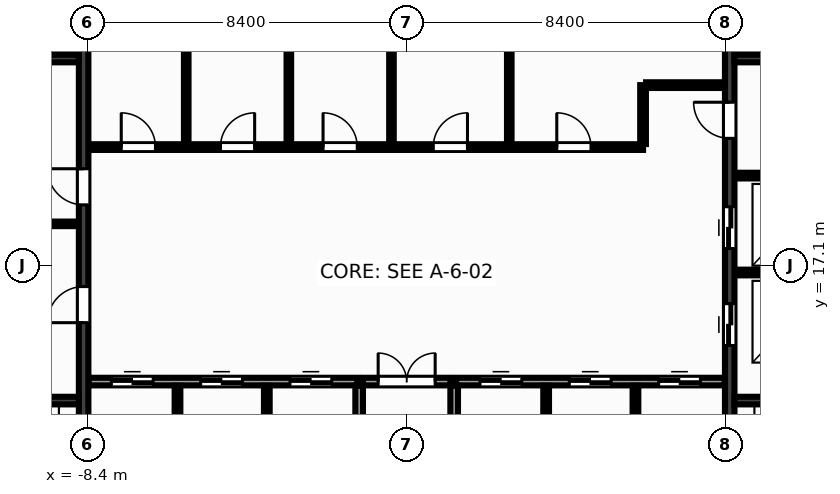
"""IFC4 building model, lengths in metres.
Left out: names, types, materials, properties, quantities, classifications, styles, units other than length and angle.
Written with IfcOpenShell. Run it as: python <this file> out.ifc"""

import sys

from ifc_helpers import new_model, si_unit, direction, frame, frame_2d, origin, place, context, subcontext, project, spatial, rectangle, extrude, source, transform, mapped, element, fill, save


model = new_model("IFC4")
c1 = context("Model", 3, precision=1e-05, world=origin(), true_north=direction((0.0, 1.0)))
c2 = subcontext(c1, "Body", "Model", "MODEL_VIEW")
j1 = project(units=[si_unit("LENGTHUNIT", "METRE"), si_unit("PLANEANGLEUNIT", "RADIAN")], contexts=[c1])
p1 = place(None, origin())
s1 = spatial("IfcSite", under=j1, at=p1, CompositionType="ELEMENT")
p2 = place(p1, origin())
s2 = spatial("IfcBuilding", under=s1, at=p2, CompositionType="ELEMENT")
p3 = place(p2, origin())
s3 = spatial("IfcBuildingStorey", under=s2, at=p3, CompositionType="ELEMENT", Elevation=0.0)
m1 = source(origin(), c2, "Body", "SweptSolid", [
    extrude(rectangle(XDim=12.8, YDim=0.25, at=frame_2d((6.4, 0.0))), origin(), (0.0, 0.0, 1.0), 5.0),
])
p4 = place(p3, frame((-8.5, 10.6, 0.0), z_axis=(0.0, 0.0, 1.0), x_axis=(0.0, 1.0, 0.0)))
e1 = element("IfcWall", 1, at=p4, inside=s3, PredefinedType="SHEAR", context=c2, shape_type="MappedRepresentation", body=[
    mapped(m1, transform((0.0, 0.0, 0.0), x_axis=(1.0, 0.0, 0.0), y_axis=(0.0, 1.0, 0.0), z_axis=(0.0, 0.0, 1.0), scale=1.0)),
])
p5 = place(p4, frame((5.0, 0.0, 0.0)))
e2 = element("IfcOpeningElement", 2, at=p5, cuts=e1, PredefinedType="OPENING", context=c2, shape_type="SweptSolid", body=[
    extrude(rectangle(XDim=0.95, YDim=2.15, at=frame_2d((0.475, 1.075))), frame((0.0, 0.137, 0.0), z_axis=(0.0, -1.0, 0.0), x_axis=(1.0, 0.0, 0.0)), (0.0, 0.0, 1.0), 0.274),
])
p6 = place(p4, frame((8.1, 0.0, 0.0)))
e3 = element("IfcOpeningElement", 3, at=p6, cuts=e1, PredefinedType="OPENING", context=c2, shape_type="SweptSolid", body=[
    extrude(rectangle(XDim=0.95, YDim=2.15, at=frame_2d((0.475, 1.075))), frame((0.0, 0.137, 0.0), z_axis=(0.0, -1.0, 0.0), x_axis=(1.0, 0.0, 0.0)), (0.0, 0.0, 1.0), 0.274),
])
p7 = place(p3, frame((8.5, 10.6, 0.0), z_axis=(0.0, 0.0, 1.0), x_axis=(0.0, 1.0, 0.0)))
e4 = element("IfcWall", 4, at=p7, inside=s3, PredefinedType="SHEAR", context=c2, shape_type="MappedRepresentation", body=[
    mapped(m1, transform((0.0, 0.0, 0.0), x_axis=(1.0, 0.0, 0.0), y_axis=(0.0, 1.0, 0.0), z_axis=(0.0, 0.0, 1.0), scale=1.0)),
])
p8 = place(p7, frame((4.4, 0.0, 0.0)))
e5 = element("IfcOpeningElement", 5, at=p8, cuts=e4, PredefinedType="OPENING", context=c2, shape_type="SweptSolid", body=[
    extrude(rectangle(XDim=1.1, YDim=2.15, at=frame_2d((0.55, 1.075))), frame((0.0, 0.137, 0.0), z_axis=(0.0, -1.0, 0.0), x_axis=(1.0, 0.0, 0.0)), (0.0, 0.0, 1.0), 0.274),
])
p9 = place(p7, frame((6.95, 0.0, 0.0)))
e6 = element("IfcOpeningElement", 6, at=p9, cuts=e4, PredefinedType="OPENING", context=c2, shape_type="SweptSolid", body=[
    extrude(rectangle(XDim=1.1, YDim=2.15, at=frame_2d((0.55, 1.075))), frame((0.0, 0.137, 0.0), z_axis=(0.0, -1.0, 0.0), x_axis=(1.0, 0.0, 0.0)), (0.0, 0.0, 1.0), 0.274),
])
p10 = place(p7, frame((9.85, 0.0, 0.0)))
e7 = element("IfcOpeningElement", 7, at=p10, cuts=e4, PredefinedType="OPENING", context=c2, shape_type="SweptSolid", body=[
    extrude(rectangle(XDim=0.95, YDim=2.15, at=frame_2d((0.475, 1.075))), frame((0.0, 0.137, 0.0), z_axis=(0.0, -1.0, 0.0), x_axis=(1.0, 0.0, 0.0)), (0.0, 0.0, 1.0), 0.274),
])
m2 = source(origin(), c2, "Body", "SweptSolid", [
    extrude(rectangle(XDim=2.825, YDim=0.2, at=frame_2d((1.413, 0.0))), origin(), (0.0, 0.0, 1.0), 5.0),
])
for number, where, z_axis, x_axis in (
    (8, (-11.45, 13.55, 0.0), (0.0, 0.0, 1.0), (1.0, 0.0, 0.0)),
    (9, (8.625, 13.55, 0.0), (0.0, 0.0, 1.0), (1.0, 0.0, 0.0)),
):
    element("IfcWall", number, at=place(p3, frame(where, z_axis=z_axis, x_axis=x_axis)), inside=s3, PredefinedType="SHEAR", context=c2, shape_type="MappedRepresentation", body=[
        mapped(m2, transform((0.0, 0.0, 0.0), x_axis=(1.0, 0.0, 0.0), y_axis=(0.0, 1.0, 0.0), z_axis=(0.0, 0.0, 1.0), scale=1.0)),
    ])
m3 = source(origin(), c2, "Body", "SweptSolid", [
    extrude(rectangle(XDim=3.02, YDim=0.2, at=frame_2d((1.51, 0.0))), origin(), (0.0, 0.0, 1.0), 5.0),
])
for number, where, z_axis, x_axis in (
    (10, (-11.645, 22.55, 0.0), (0.0, 0.0, 1.0), (1.0, 0.0, 0.0)),
    (11, (8.625, 22.55, 0.0), (0.0, 0.0, 1.0), (1.0, 0.0, 0.0)),
):
    element("IfcWall", number, at=place(p3, frame(where, z_axis=z_axis, x_axis=x_axis)), inside=s3, PredefinedType="SHEAR", context=c2, shape_type="MappedRepresentation", body=[
        mapped(m3, transform((0.0, 0.0, 0.0), x_axis=(1.0, 0.0, 0.0), y_axis=(0.0, 1.0, 0.0), z_axis=(0.0, 0.0, 1.0), scale=1.0)),
    ])
m4 = source(origin(), c2, "Body", "SweptSolid", [
    extrude(rectangle(XDim=3.01, YDim=0.12, at=frame_2d((1.505, 0.0))), origin(), (0.0, 0.0, 1.0), 4.72),
])
p11 = place(p3, frame((-11.64, 18.2, 0.0), z_axis=(0.0, 0.0, 1.0), x_axis=(1.0, 0.0, 0.0)))
e12 = element("IfcWall", 12, at=p11, inside=s3, PredefinedType="PARTITIONING", context=c2, shape_type="MappedRepresentation", body=[
    mapped(m4, transform((0.0, 0.0, 0.0), x_axis=(1.0, 0.0, 0.0), y_axis=(0.0, 1.0, 0.0), z_axis=(0.0, 0.0, 1.0), scale=1.0)),
])
m5 = source(origin(), c2, "Body", "SweptSolid", [
    extrude(rectangle(XDim=3.01, YDim=0.15, at=frame_2d((1.505, 0.0))), origin(), (0.0, 0.0, 1.0), 4.72),
])
for number, where, z_axis, x_axis in (
    (13, (8.63, 16.92, 0.0), (0.0, 0.0, 1.0), (1.0, 0.0, 0.0)),
    (14, (8.63, 19.47, 0.0), (0.0, 0.0, 1.0), (1.0, 0.0, 0.0)),
):
    element("IfcWall", number, at=place(p3, frame(where, z_axis=z_axis, x_axis=x_axis)), inside=s3, PredefinedType="PARTITIONING", context=c2, shape_type="MappedRepresentation", body=[
        mapped(m5, transform((0.0, 0.0, 0.0), x_axis=(1.0, 0.0, 0.0), y_axis=(0.0, 1.0, 0.0), z_axis=(0.0, 0.0, 1.0), scale=1.0)),
    ])
m6 = source(origin(), c2, "Body", "SweptSolid", [
    extrude(rectangle(XDim=7.07, YDim=0.2, at=frame_2d((3.535, 0.0))), origin(), (0.0, 0.0, 1.0), 4.72),
])
p12 = place(p3, frame((-8.37, 14.05, 0.0), z_axis=(0.0, 0.0, 1.0), x_axis=(1.0, 0.0, 0.0)))
e15 = element("IfcWall", 15, at=p12, inside=s3, PredefinedType="PARTITIONING", context=c2, shape_type="MappedRepresentation", body=[
    mapped(m6, transform((0.0, 0.0, 0.0), x_axis=(1.0, 0.0, 0.0), y_axis=(0.0, 1.0, 0.0), z_axis=(0.0, 0.0, 1.0), scale=1.0)),
])
p13 = place(p12, frame((0.6, 0.0, 0.0)))
e16 = element("IfcOpeningElement", 16, at=p13, cuts=e15, PredefinedType="OPENING", context=c2, shape_type="SweptSolid", body=[
    extrude(rectangle(XDim=1.1, YDim=2.15, at=frame_2d((0.55, 1.075))), frame((0.0, 0.112, 0.0), z_axis=(0.0, -1.0, 0.0), x_axis=(1.0, 0.0, 0.0)), (0.0, 0.0, 1.0), 0.224),
])
p14 = place(p12, frame((2.95, 0.0, 0.0)))
e17 = element("IfcOpeningElement", 17, at=p14, cuts=e15, PredefinedType="OPENING", context=c2, shape_type="SweptSolid", body=[
    extrude(rectangle(XDim=1.1, YDim=2.15, at=frame_2d((0.55, 1.075))), frame((0.0, 0.112, 0.0), z_axis=(0.0, -1.0, 0.0), x_axis=(1.0, 0.0, 0.0)), (0.0, 0.0, 1.0), 0.224),
])
p15 = place(p12, frame((5.3, 0.0, 0.0)))
e18 = element("IfcOpeningElement", 18, at=p15, cuts=e15, PredefinedType="OPENING", context=c2, shape_type="SweptSolid", body=[
    extrude(rectangle(XDim=1.1, YDim=2.15, at=frame_2d((0.55, 1.075))), frame((0.0, 0.112, 0.0), z_axis=(0.0, -1.0, 0.0), x_axis=(1.0, 0.0, 0.0)), (0.0, 0.0, 1.0), 0.224),
])
p16 = place(p3, frame((1.3, 14.05, 0.0), z_axis=(0.0, 0.0, 1.0), x_axis=(1.0, 0.0, 0.0)))
e19 = element("IfcWall", 19, at=p16, inside=s3, PredefinedType="PARTITIONING", context=c2, shape_type="MappedRepresentation", body=[
    mapped(m6, transform((0.0, 0.0, 0.0), x_axis=(1.0, 0.0, 0.0), y_axis=(0.0, 1.0, 0.0), z_axis=(0.0, 0.0, 1.0), scale=1.0)),
])
p17 = place(p16, frame((0.63, 0.0, 0.0)))
e20 = element("IfcOpeningElement", 20, at=p17, cuts=e19, PredefinedType="OPENING", context=c2, shape_type="SweptSolid", body=[
    extrude(rectangle(XDim=1.1, YDim=2.15, at=frame_2d((0.55, 1.075))), frame((0.0, 0.112, 0.0), z_axis=(0.0, -1.0, 0.0), x_axis=(1.0, 0.0, 0.0)), (0.0, 0.0, 1.0), 0.224),
])
p18 = place(p16, frame((2.98, 0.0, 0.0)))
e21 = element("IfcOpeningElement", 21, at=p18, cuts=e19, PredefinedType="OPENING", context=c2, shape_type="SweptSolid", body=[
    extrude(rectangle(XDim=1.1, YDim=2.15, at=frame_2d((0.55, 1.075))), frame((0.0, 0.112, 0.0), z_axis=(0.0, -1.0, 0.0), x_axis=(1.0, 0.0, 0.0)), (0.0, 0.0, 1.0), 0.224),
])
p19 = place(p16, frame((5.33, 0.0, 0.0)))
e22 = element("IfcOpeningElement", 22, at=p19, cuts=e19, PredefinedType="OPENING", context=c2, shape_type="SweptSolid", body=[
    extrude(rectangle(XDim=1.1, YDim=2.15, at=frame_2d((0.55, 1.075))), frame((0.0, 0.112, 0.0), z_axis=(0.0, -1.0, 0.0), x_axis=(1.0, 0.0, 0.0)), (0.0, 0.0, 1.0), 0.224),
])
m7 = source(origin(), c2, "Body", "SweptSolid", [
    extrude(rectangle(XDim=3.34, YDim=0.2, at=frame_2d((1.67, 0.0))), origin(), (0.0, 0.0, 1.0), 4.72),
])
for number, where, z_axis, x_axis in (
    (23, (-1.25, 10.6, 0.0), (0.0, 0.0, 1.0), (0.0, 1.0, 0.0)),
    (24, (1.25, 10.6, 0.0), (0.0, 0.0, 1.0), (0.0, 1.0, 0.0)),
):
    element("IfcWall", number, at=place(p3, frame(where, z_axis=z_axis, x_axis=x_axis)), inside=s3, PredefinedType="PARTITIONING", context=c2, shape_type="MappedRepresentation", body=[
        mapped(m7, transform((0.0, 0.0, 0.0), x_axis=(1.0, 0.0, 0.0), y_axis=(0.0, 1.0, 0.0), z_axis=(0.0, 0.0, 1.0), scale=1.0)),
    ])
m8 = source(origin(), c2, "Body", "SweptSolid", [
    extrude(rectangle(XDim=2.3, YDim=0.2, at=frame_2d((1.15, 0.0))), origin(), (0.0, 0.0, 1.0), 4.72),
])
p20 = place(p3, frame((-1.15, 14.05, 0.0), z_axis=(0.0, 0.0, 1.0), x_axis=(1.0, 0.0, 0.0)))
e25 = element("IfcWall", 25, at=p20, inside=s3, PredefinedType="PARTITIONING", context=c2, shape_type="MappedRepresentation", body=[
    mapped(m8, transform((0.0, 0.0, 0.0), x_axis=(1.0, 0.0, 0.0), y_axis=(0.0, 1.0, 0.0), z_axis=(0.0, 0.0, 1.0), scale=1.0)),
])
p21 = place(p20, frame((0.4, 0.0, 0.0)))
e26 = element("IfcOpeningElement", 26, at=p21, cuts=e25, PredefinedType="OPENING", context=c2, shape_type="SweptSolid", body=[
    extrude(rectangle(XDim=1.5, YDim=2.2, at=frame_2d((0.75, 1.1))), frame((0.0, 0.112, 0.0), z_axis=(0.0, -1.0, 0.0), x_axis=(1.0, 0.0, 0.0)), (0.0, 0.0, 1.0), 0.224),
])
m9 = source(origin(), c2, "Body", "SweptSolid", [
    extrude(rectangle(XDim=14.59, YDim=0.15, at=frame_2d((7.295, 0.0))), origin(), (0.0, 0.0, 1.0), 4.72),
])
p22 = place(p3, frame((-8.37, 20.22, 0.0), z_axis=(0.0, 0.0, 1.0), x_axis=(1.0, 0.0, 0.0)))
e27 = element("IfcWall", 27, at=p22, inside=s3, PredefinedType="PARTITIONING", context=c2, shape_type="MappedRepresentation", body=[
    mapped(m9, transform((0.0, 0.0, 0.0), x_axis=(1.0, 0.0, 0.0), y_axis=(0.0, 1.0, 0.0), z_axis=(0.0, 0.0, 1.0), scale=1.0)),
])
p23 = place(p22, frame((0.86, 0.0, 0.0)))
e28 = element("IfcOpeningElement", 28, at=p23, cuts=e27, PredefinedType="OPENING", context=c2, shape_type="SweptSolid", body=[
    extrude(rectangle(XDim=0.9, YDim=2.15, at=frame_2d((0.45, 1.075))), frame((0.0, 0.087, 0.0), z_axis=(0.0, -1.0, 0.0), x_axis=(1.0, 0.0, 0.0)), (0.0, 0.0, 1.0), 0.174),
])
p24 = place(p22, frame((3.47, 0.0, 0.0)))
e29 = element("IfcOpeningElement", 29, at=p24, cuts=e27, PredefinedType="OPENING", context=c2, shape_type="SweptSolid", body=[
    extrude(rectangle(XDim=0.9, YDim=2.15, at=frame_2d((0.45, 1.075))), frame((0.0, 0.087, 0.0), z_axis=(0.0, -1.0, 0.0), x_axis=(1.0, 0.0, 0.0)), (0.0, 0.0, 1.0), 0.174),
])
p25 = place(p22, frame((6.17, 0.0, 0.0)))
e30 = element("IfcOpeningElement", 30, at=p25, cuts=e27, PredefinedType="OPENING", context=c2, shape_type="SweptSolid", body=[
    extrude(rectangle(XDim=0.9, YDim=2.15, at=frame_2d((0.45, 1.075))), frame((0.0, 0.087, 0.0), z_axis=(0.0, -1.0, 0.0), x_axis=(1.0, 0.0, 0.0)), (0.0, 0.0, 1.0), 0.174),
])
p26 = place(p22, frame((9.07, 0.0, 0.0)))
e31 = element("IfcOpeningElement", 31, at=p26, cuts=e27, PredefinedType="OPENING", context=c2, shape_type="SweptSolid", body=[
    extrude(rectangle(XDim=0.9, YDim=2.15, at=frame_2d((0.45, 1.075))), frame((0.0, 0.087, 0.0), z_axis=(0.0, -1.0, 0.0), x_axis=(1.0, 0.0, 0.0)), (0.0, 0.0, 1.0), 0.174),
])
p27 = place(p22, frame((12.32, 0.0, 0.0)))
e32 = element("IfcOpeningElement", 32, at=p27, cuts=e27, PredefinedType="OPENING", context=c2, shape_type="SweptSolid", body=[
    extrude(rectangle(XDim=0.9, YDim=2.15, at=frame_2d((0.45, 1.075))), frame((0.0, 0.087, 0.0), z_axis=(0.0, -1.0, 0.0), x_axis=(1.0, 0.0, 0.0)), (0.0, 0.0, 1.0), 0.174),
])
m10 = source(origin(), c2, "Body", "SweptSolid", [
    extrude(rectangle(XDim=1.55, YDim=0.15, at=frame_2d((0.775, 0.0))), origin(), (0.0, 0.0, 1.0), 4.72),
])
p28 = place(p3, frame((6.22, 20.3, 0.0), z_axis=(0.0, 0.0, 1.0), x_axis=(0.0, 1.0, 0.0)))
e33 = element("IfcWall", 33, at=p28, inside=s3, PredefinedType="PARTITIONING", context=c2, shape_type="MappedRepresentation", body=[
    mapped(m10, transform((0.0, 0.0, 0.0), x_axis=(1.0, 0.0, 0.0), y_axis=(0.0, 1.0, 0.0), z_axis=(0.0, 0.0, 1.0), scale=1.0)),
])
m11 = source(origin(), c2, "Body", "SweptSolid", [
    extrude(rectangle(XDim=2.07, YDim=0.15, at=frame_2d((1.035, 0.0))), origin(), (0.0, 0.0, 1.0), 4.72),
])
p29 = place(p3, frame((6.3, 21.85, 0.0), z_axis=(0.0, 0.0, 1.0), x_axis=(1.0, 0.0, 0.0)))
e34 = element("IfcWall", 34, at=p29, inside=s3, PredefinedType="PARTITIONING", context=c2, shape_type="MappedRepresentation", body=[
    mapped(m11, transform((0.0, 0.0, 0.0), x_axis=(1.0, 0.0, 0.0), y_axis=(0.0, 1.0, 0.0), z_axis=(0.0, 0.0, 1.0), scale=1.0)),
])
m12 = source(origin(), c2, "Body", "SweptSolid", [
    extrude(rectangle(XDim=3.34, YDim=0.15, at=frame_2d((1.67, 0.0))), origin(), (0.0, 0.0, 1.0), 4.72),
])
for number, where, z_axis, x_axis in (
    (35, (-6.03, 10.6, 0.0), (0.0, 0.0, 1.0), (0.0, 1.0, 0.0)),
    (36, (-3.68, 10.6, 0.0), (0.0, 0.0, 1.0), (0.0, 1.0, 0.0)),
    (37, (3.67, 10.6, 0.0), (0.0, 0.0, 1.0), (0.0, 1.0, 0.0)),
    (38, (6.02, 10.6, 0.0), (0.0, 0.0, 1.0), (0.0, 1.0, 0.0)),
):
    element("IfcWall", number, at=place(p3, frame(where, z_axis=z_axis, x_axis=x_axis)), inside=s3, PredefinedType="PARTITIONING", context=c2, shape_type="MappedRepresentation", body=[
        mapped(m12, transform((0.0, 0.0, 0.0), x_axis=(1.0, 0.0, 0.0), y_axis=(0.0, 1.0, 0.0), z_axis=(0.0, 0.0, 1.0), scale=1.0)),
    ])
m13 = source(origin(), c2, "Body", "SweptSolid", [
    extrude(rectangle(XDim=3.04, YDim=0.12, at=frame_2d((1.52, 0.0))), origin(), (0.0, 0.0, 1.0), 4.72),
])
for number, where, z_axis, x_axis in (
    (39, (-5.8, 20.32, 0.0), (0.0, 0.0, 1.0), (0.0, 1.0, 0.0)),
    (40, (-3.1, 20.32, 0.0), (0.0, 0.0, 1.0), (0.0, 1.0, 0.0)),
    (41, (-0.4, 20.32, 0.0), (0.0, 0.0, 1.0), (0.0, 1.0, 0.0)),
    (42, (2.7, 20.32, 0.0), (0.0, 0.0, 1.0), (0.0, 1.0, 0.0)),
):
    element("IfcWall", number, at=place(p3, frame(where, z_axis=z_axis, x_axis=x_axis)), inside=s3, PredefinedType="PARTITIONING", context=c2, shape_type="MappedRepresentation", body=[
        mapped(m13, transform((0.0, 0.0, 0.0), x_axis=(1.0, 0.0, 0.0), y_axis=(0.0, 1.0, 0.0), z_axis=(0.0, 0.0, 1.0), scale=1.0)),
    ])
m14 = source(origin(), c2, "Body", "SweptSolid", [
    extrude(rectangle(XDim=0.95, YDim=2.15, at=frame_2d((0.475, 1.075))), frame((0.0, 0.025, 0.0), z_axis=(0.0, -1.0, 0.0), x_axis=(1.0, 0.0, 0.0)), (0.0, 0.0, 1.0), 0.05),
])
p30 = place(p5, origin())
e43 = element("IfcDoor", 43, at=p30, inside=s3, OperationType="SINGLE_SWING_LEFT", PredefinedType="DOOR", context=c2, shape_type="MappedRepresentation", body=[
    mapped(m14, transform((0.0, 0.0, 0.0), x_axis=(1.0, 0.0, 0.0), y_axis=(0.0, 1.0, 0.0), z_axis=(0.0, 0.0, 1.0), scale=1.0)),
])
fill(e2, e43)
p31 = place(p6, origin())
e44 = element("IfcDoor", 44, at=p31, inside=s3, OperationType="SINGLE_SWING_RIGHT", PredefinedType="DOOR", context=c2, shape_type="MappedRepresentation", body=[
    mapped(m14, transform((0.0, 0.0, 0.0), x_axis=(1.0, 0.0, 0.0), y_axis=(0.0, 1.0, 0.0), z_axis=(0.0, 0.0, 1.0), scale=1.0)),
])
fill(e3, e44)
m15 = source(origin(), c2, "Body", "SweptSolid", [
    extrude(rectangle(XDim=1.1, YDim=2.15, at=frame_2d((0.55, 1.075))), frame((0.0, 0.025, 0.0), z_axis=(0.0, -1.0, 0.0), x_axis=(1.0, 0.0, 0.0)), (0.0, 0.0, 1.0), 0.05),
])
p32 = place(p8, origin())
e45 = element("IfcDoor", 45, at=p32, inside=s3, OperationType="DOUBLE_DOOR_SLIDING", PredefinedType="DOOR", context=c2, shape_type="MappedRepresentation", body=[
    mapped(m15, transform((0.0, 0.0, 0.0), x_axis=(1.0, 0.0, 0.0), y_axis=(0.0, 1.0, 0.0), z_axis=(0.0, 0.0, 1.0), scale=1.0)),
])
fill(e5, e45)
p33 = place(p9, origin())
e46 = element("IfcDoor", 46, at=p33, inside=s3, OperationType="DOUBLE_DOOR_SLIDING", PredefinedType="DOOR", context=c2, shape_type="MappedRepresentation", body=[
    mapped(m15, transform((0.0, 0.0, 0.0), x_axis=(1.0, 0.0, 0.0), y_axis=(0.0, 1.0, 0.0), z_axis=(0.0, 0.0, 1.0), scale=1.0)),
])
fill(e6, e46)
m16 = source(origin(), c2, "Body", "SweptSolid", [
    extrude(rectangle(XDim=0.95, YDim=2.15, at=frame_2d((0.475, 1.075))), frame((0.0, 0.025, 0.0), z_axis=(0.0, -1.0, 0.0), x_axis=(1.0, 0.0, 0.0)), (0.0, 0.0, 1.0), 0.05),
])
p34 = place(p10, origin())
e47 = element("IfcDoor", 47, at=p34, inside=s3, OperationType="SINGLE_SWING_RIGHT", PredefinedType="DOOR", context=c2, shape_type="MappedRepresentation", body=[
    mapped(m16, transform((0.0, 0.0, 0.0), x_axis=(1.0, 0.0, 0.0), y_axis=(0.0, 1.0, 0.0), z_axis=(0.0, 0.0, 1.0), scale=1.0)),
])
fill(e7, e47)
p35 = place(p13, origin())
e48 = element("IfcDoor", 48, at=p35, inside=s3, OperationType="DOUBLE_DOOR_SLIDING", PredefinedType="DOOR", context=c2, shape_type="MappedRepresentation", body=[
    mapped(m15, transform((0.0, 0.0, 0.0), x_axis=(1.0, 0.0, 0.0), y_axis=(0.0, 1.0, 0.0), z_axis=(0.0, 0.0, 1.0), scale=1.0)),
])
fill(e16, e48)
p36 = place(p14, origin())
e49 = element("IfcDoor", 49, at=p36, inside=s3, OperationType="DOUBLE_DOOR_SLIDING", PredefinedType="DOOR", context=c2, shape_type="MappedRepresentation", body=[
    mapped(m15, transform((0.0, 0.0, 0.0), x_axis=(1.0, 0.0, 0.0), y_axis=(0.0, 1.0, 0.0), z_axis=(0.0, 0.0, 1.0), scale=1.0)),
])
fill(e17, e49)
p37 = place(p15, origin())
e50 = element("IfcDoor", 50, at=p37, inside=s3, OperationType="DOUBLE_DOOR_SLIDING", PredefinedType="DOOR", context=c2, shape_type="MappedRepresentation", body=[
    mapped(m15, transform((0.0, 0.0, 0.0), x_axis=(1.0, 0.0, 0.0), y_axis=(0.0, 1.0, 0.0), z_axis=(0.0, 0.0, 1.0), scale=1.0)),
])
fill(e18, e50)
p38 = place(p17, origin())
e51 = element("IfcDoor", 51, at=p38, inside=s3, OperationType="DOUBLE_DOOR_SLIDING", PredefinedType="DOOR", context=c2, shape_type="MappedRepresentation", body=[
    mapped(m15, transform((0.0, 0.0, 0.0), x_axis=(1.0, 0.0, 0.0), y_axis=(0.0, 1.0, 0.0), z_axis=(0.0, 0.0, 1.0), scale=1.0)),
])
fill(e20, e51)
p39 = place(p18, origin())
e52 = element("IfcDoor", 52, at=p39, inside=s3, OperationType="DOUBLE_DOOR_SLIDING", PredefinedType="DOOR", context=c2, shape_type="MappedRepresentation", body=[
    mapped(m15, transform((0.0, 0.0, 0.0), x_axis=(1.0, 0.0, 0.0), y_axis=(0.0, 1.0, 0.0), z_axis=(0.0, 0.0, 1.0), scale=1.0)),
])
fill(e21, e52)
p40 = place(p19, origin())
e53 = element("IfcDoor", 53, at=p40, inside=s3, OperationType="DOUBLE_DOOR_SLIDING", PredefinedType="DOOR", context=c2, shape_type="MappedRepresentation", body=[
    mapped(m15, transform((0.0, 0.0, 0.0), x_axis=(1.0, 0.0, 0.0), y_axis=(0.0, 1.0, 0.0), z_axis=(0.0, 0.0, 1.0), scale=1.0)),
])
fill(e22, e53)
m17 = source(origin(), c2, "Body", "SweptSolid", [
    extrude(rectangle(XDim=1.5, YDim=2.2, at=frame_2d((0.75, 1.1))), frame((0.0, 0.025, 0.0), z_axis=(0.0, -1.0, 0.0), x_axis=(1.0, 0.0, 0.0)), (0.0, 0.0, 1.0), 0.05),
])
p41 = place(p21, origin())
e54 = element("IfcDoor", 54, at=p41, inside=s3, OperationType="DOUBLE_DOOR_SINGLE_SWING", PredefinedType="DOOR", context=c2, shape_type="MappedRepresentation", body=[
    mapped(m17, transform((0.0, 0.0, 0.0), x_axis=(1.0, 0.0, 0.0), y_axis=(0.0, 1.0, 0.0), z_axis=(0.0, 0.0, 1.0), scale=1.0)),
])
fill(e26, e54)
m18 = source(origin(), c2, "Body", "SweptSolid", [
    extrude(rectangle(XDim=0.9, YDim=2.15, at=frame_2d((0.45, 1.075))), frame((0.0, 0.025, 0.0), z_axis=(0.0, -1.0, 0.0), x_axis=(1.0, 0.0, 0.0)), (0.0, 0.0, 1.0), 0.05),
])
p42 = place(p23, origin())
e55 = element("IfcDoor", 55, at=p42, inside=s3, OperationType="SINGLE_SWING_LEFT", PredefinedType="DOOR", context=c2, shape_type="MappedRepresentation", body=[
    mapped(m18, transform((0.0, 0.0, 0.0), x_axis=(1.0, 0.0, 0.0), y_axis=(0.0, 1.0, 0.0), z_axis=(0.0, 0.0, 1.0), scale=1.0)),
])
fill(e28, e55)
p43 = place(p24, origin())
e56 = element("IfcDoor", 56, at=p43, inside=s3, OperationType="SINGLE_SWING_RIGHT", PredefinedType="DOOR", context=c2, shape_type="MappedRepresentation", body=[
    mapped(m18, transform((0.0, 0.0, 0.0), x_axis=(1.0, 0.0, 0.0), y_axis=(0.0, 1.0, 0.0), z_axis=(0.0, 0.0, 1.0), scale=1.0)),
])
fill(e29, e56)
p44 = place(p25, origin())
e57 = element("IfcDoor", 57, at=p44, inside=s3, OperationType="SINGLE_SWING_LEFT", PredefinedType="DOOR", context=c2, shape_type="MappedRepresentation", body=[
    mapped(m18, transform((0.0, 0.0, 0.0), x_axis=(1.0, 0.0, 0.0), y_axis=(0.0, 1.0, 0.0), z_axis=(0.0, 0.0, 1.0), scale=1.0)),
])
fill(e30, e57)
p45 = place(p26, origin())
e58 = element("IfcDoor", 58, at=p45, inside=s3, OperationType="SINGLE_SWING_RIGHT", PredefinedType="DOOR", context=c2, shape_type="MappedRepresentation", body=[
    mapped(m18, transform((0.0, 0.0, 0.0), x_axis=(1.0, 0.0, 0.0), y_axis=(0.0, 1.0, 0.0), z_axis=(0.0, 0.0, 1.0), scale=1.0)),
])
fill(e31, e58)
p46 = place(p27, origin())
e59 = element("IfcDoor", 59, at=p46, inside=s3, OperationType="SINGLE_SWING_LEFT", PredefinedType="DOOR", context=c2, shape_type="MappedRepresentation", body=[
    mapped(m18, transform((0.0, 0.0, 0.0), x_axis=(1.0, 0.0, 0.0), y_axis=(0.0, 1.0, 0.0), z_axis=(0.0, 0.0, 1.0), scale=1.0)),
])
fill(e32, e59)
save(model, sys.argv[1])
